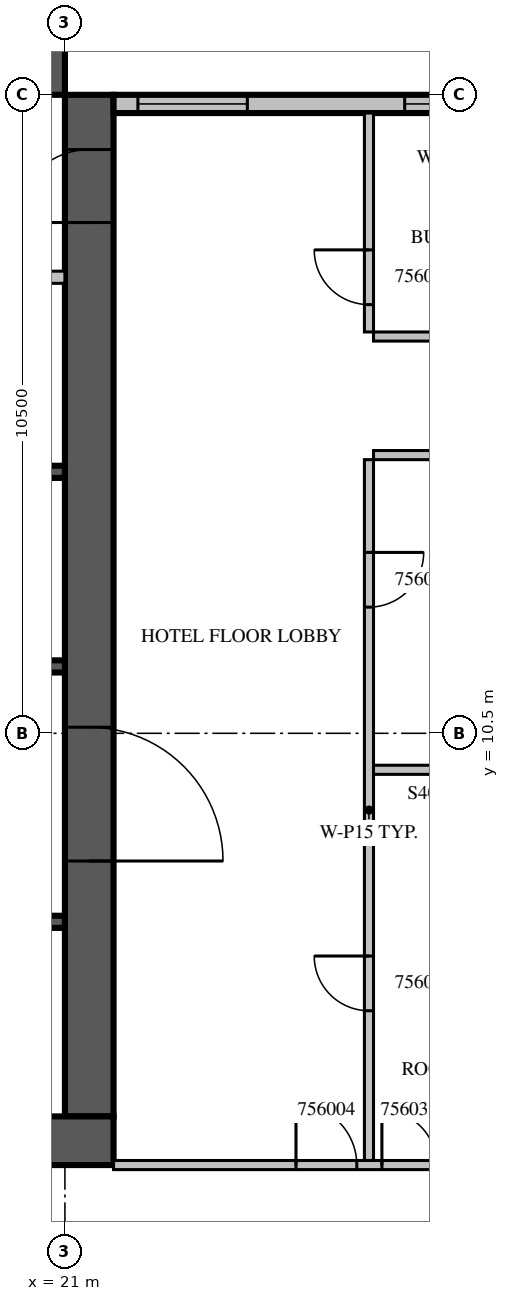
"""IFC4 building model, lengths in metres.
Left out: names, types, materials, properties, quantities, classifications, styles, units other than length and angle.
Written with IfcOpenShell. Run it as: python <this file> out.ifc"""

import sys

from ifc_helpers import new_model, si_unit, direction, frame, frame_2d, origin, place, context, subcontext, project, spatial, rectangle, extrude, source, transform, mapped, element, fill, save


model = new_model("IFC4")
c1 = context("Model", 3, precision=1e-05, world=origin(), true_north=direction((0.0, 1.0)))
c2 = subcontext(c1, "Body", "Model", "MODEL_VIEW")
j1 = project(units=[si_unit("LENGTHUNIT", "METRE"), si_unit("PLANEANGLEUNIT", "RADIAN")], contexts=[c1])
p1 = place(None, origin())
s1 = spatial("IfcSite", under=j1, at=p1, CompositionType="ELEMENT")
p2 = place(p1, origin())
s2 = spatial("IfcBuilding", under=s1, at=p2, CompositionType="ELEMENT")
p3 = place(p2, frame((0.0, 0.0, 246.2)))
s3 = spatial("IfcBuildingStorey", under=s2, at=p3, CompositionType="ELEMENT", Elevation=246.2)
m1 = source(origin(), c2, "Body", "SweptSolid", [
    extrude(rectangle(XDim=16.8, YDim=0.8, at=frame_2d((8.4, 0.0))), origin(), (0.0, 0.0, 1.0), 3.8),
])
p4 = place(p3, frame((21.4, 4.2, 0.0), z_axis=(0.0, 0.0, 1.0), x_axis=(0.0, 1.0, 0.0)))
e1 = element("IfcWall", 1, at=p4, inside=s3, PredefinedType="SHEAR", context=c2, shape_type="MappedRepresentation", body=[
    mapped(m1, transform((0.0, 0.0, 0.0), scale=1.0)),
])
m2 = source(origin(), c2, "Body", "SweptSolid", [
    extrude(rectangle(XDim=2.2, YDim=2.1, at=frame_2d((1.1, 1.05))), frame((0.0, 0.41, 0.0), z_axis=(0.0, -1.0, 0.0), x_axis=(1.0, 0.0, 0.0)), (0.0, 0.0, 1.0), 0.82),
])
p5 = place(p4, frame((4.2, 0.0, 0.0)))
e2 = element("IfcOpeningElement", 2, at=p5, cuts=e1, PredefinedType="OPENING", context=c2, shape_type="MappedRepresentation", body=[
    mapped(m2, transform((0.0, 0.0, 0.0), scale=1.0)),
])
m3 = source(origin(), c2, "Body", "SweptSolid", [
    extrude(rectangle(XDim=1.2, YDim=2.1, at=frame_2d((0.6, 1.05))), frame((0.0, 0.41, 0.0), z_axis=(0.0, -1.0, 0.0), x_axis=(1.0, 0.0, 0.0)), (0.0, 0.0, 1.0), 0.82),
])
p6 = place(p4, frame((14.7, 0.0, 0.0)))
e3 = element("IfcOpeningElement", 3, at=p6, cuts=e1, PredefinedType="OPENING", context=c2, shape_type="MappedRepresentation", body=[
    mapped(m3, transform((0.0, 0.0, 0.0), scale=1.0)),
])
m4 = source(origin(), c2, "Body", "SweptSolid", [
    extrude(rectangle(XDim=17.6, YDim=0.8, at=frame_2d((8.8, 0.0))), origin(), (0.0, 0.0, 1.0), 3.8),
])
p7 = place(p3, frame((4.2, 3.8, 0.0), z_axis=(0.0, 0.0, 1.0), x_axis=(1.0, 0.0, 0.0)))
e4 = element("IfcWall", 4, at=p7, inside=s3, PredefinedType="SHEAR", context=c2, shape_type="MappedRepresentation", body=[
    mapped(m4, transform((0.0, 0.0, 0.0), scale=1.0)),
])
m5 = source(origin(), c2, "Body", "SweptSolid", [
    extrude(rectangle(XDim=0.9, YDim=2.1, at=frame_2d((0.45, 1.05))), frame((0.0, 0.41, 0.0), z_axis=(0.0, -1.0, 0.0), x_axis=(1.0, 0.0, 0.0)), (0.0, 0.0, 1.0), 0.82),
])
p8 = place(p7, frame((12.75, 0.0, 0.0)))
e5 = element("IfcOpeningElement", 5, at=p8, cuts=e4, PredefinedType="OPENING", context=c2, shape_type="MappedRepresentation", body=[
    mapped(m5, transform((0.0, 0.0, 0.0), scale=1.0)),
])
p9 = place(p3, frame((4.2, 21.4, 0.0), z_axis=(0.0, 0.0, 1.0), x_axis=(1.0, 0.0, 0.0)))
e6 = element("IfcWall", 6, at=p9, inside=s3, PredefinedType="SHEAR", context=c2, shape_type="MappedRepresentation", body=[
    mapped(m1, transform((0.0, 0.0, 0.0), scale=1.0)),
])
p10 = place(p9, frame((6.2, 0.0, 0.0)))
e7 = element("IfcOpeningElement", 7, at=p10, cuts=e6, PredefinedType="OPENING", context=c2, shape_type="MappedRepresentation", body=[
    mapped(m3, transform((0.0, 0.0, 0.0), scale=1.0)),
])
m6 = source(origin(), c2, "Body", "SweptSolid", [
    extrude(rectangle(XDim=7.2, YDim=0.3, at=frame_2d((3.6, 0.0))), origin(), (0.0, 0.0, 1.0), 3.4),
])
p11 = place(p3, frame((29.0, 20.85, 0.0), z_axis=(0.0, 0.0, 1.0), x_axis=(-1.0, 0.0, 0.0)))
e8 = element("IfcWall", 8, at=p11, inside=s3, PredefinedType="STANDARD", context=c2, shape_type="MappedRepresentation", body=[
    mapped(m6, transform((0.0, 0.0, 0.0), scale=1.0)),
])
m7 = source(origin(), c2, "Body", "SweptSolid", [
    extrude(rectangle(XDim=1.8, YDim=2.3, at=frame_2d((0.9, 1.15))), frame((0.0, 0.16, 0.0), z_axis=(0.0, -1.0, 0.0), x_axis=(1.0, 0.0, 0.0)), (0.0, 0.0, 1.0), 0.32),
])
p12 = place(p11, frame((0.613, 0.0, 0.6)))
e9 = element("IfcOpeningElement", 9, at=p12, cuts=e8, PredefinedType="OPENING", context=c2, shape_type="MappedRepresentation", body=[
    mapped(m7, transform((0.0, 0.0, 0.0), scale=1.0)),
])
p13 = place(p11, frame((5.0, 0.0, 0.6)))
e10 = element("IfcOpeningElement", 10, at=p13, cuts=e8, PredefinedType="OPENING", context=c2, shape_type="MappedRepresentation", body=[
    mapped(m7, transform((0.0, 0.0, 0.0), scale=1.0)),
])
m8 = source(origin(), c2, "Body", "SweptSolid", [
    extrude(rectangle(XDim=2.4, YDim=0.2, at=frame_2d((1.2, 0.0))), origin(), (0.0, 0.0, 1.0), 3.8),
])
p14 = place(p3, frame((18.6, 7.4, 0.0), z_axis=(0.0, 0.0, 1.0), x_axis=(1.0, 0.0, 0.0)))
e11 = element("IfcWall", 11, at=p14, inside=s3, PredefinedType="SOLIDWALL", context=c2, shape_type="MappedRepresentation", body=[
    mapped(m8, transform((0.0, 0.0, 0.0), scale=1.0)),
])
m9 = source(origin(), c2, "Body", "SweptSolid", [
    extrude(rectangle(XDim=9.6, YDim=0.2, at=frame_2d((4.8, 0.0))), origin(), (0.0, 0.0, 1.0), 3.8),
])
p15 = place(p3, frame((11.4, 11.6, 0.0), z_axis=(0.0, 0.0, 1.0), x_axis=(1.0, 0.0, 0.0)))
e12 = element("IfcWall", 12, at=p15, inside=s3, PredefinedType="SOLIDWALL", context=c2, shape_type="MappedRepresentation", body=[
    mapped(m9, transform((0.0, 0.0, 0.0), scale=1.0)),
])
p16 = place(p3, frame((11.4, 14.8, 0.0), z_axis=(0.0, 0.0, 1.0), x_axis=(1.0, 0.0, 0.0)))
e13 = element("IfcWall", 13, at=p16, inside=s3, PredefinedType="SOLIDWALL", context=c2, shape_type="MappedRepresentation", body=[
    mapped(m9, transform((0.0, 0.0, 0.0), scale=1.0)),
])
m10 = source(origin(), c2, "Body", "SweptSolid", [
    extrude(rectangle(XDim=1.1, YDim=2.1, at=frame_2d((0.55, 1.05))), frame((0.0, 0.11, 0.0), z_axis=(0.0, -1.0, 0.0), x_axis=(1.0, 0.0, 0.0)), (0.0, 0.0, 1.0), 0.22),
])
p17 = place(p16, frame((3.05, 0.0, 0.0)))
e14 = element("IfcOpeningElement", 14, at=p17, cuts=e13, PredefinedType="OPENING", context=c2, shape_type="MappedRepresentation", body=[
    mapped(m10, transform((0.0, 0.0, 0.0), scale=1.0)),
])
p18 = place(p16, frame((5.45, 0.0, 0.0)))
e15 = element("IfcOpeningElement", 15, at=p18, cuts=e13, PredefinedType="OPENING", context=c2, shape_type="MappedRepresentation", body=[
    mapped(m10, transform((0.0, 0.0, 0.0), scale=1.0)),
])
p19 = place(p16, frame((7.85, 0.0, 0.0)))
e16 = element("IfcOpeningElement", 16, at=p19, cuts=e13, PredefinedType="OPENING", context=c2, shape_type="MappedRepresentation", body=[
    mapped(m10, transform((0.0, 0.0, 0.0), scale=1.0)),
])
m11 = source(origin(), c2, "Body", "SweptSolid", [
    extrude(rectangle(XDim=11.45, YDim=0.2, at=frame_2d((5.725, 0.0))), origin(), (0.0, 0.0, 1.0), 3.4),
])
p20 = place(p3, frame((9.55, 18.0, 0.0), z_axis=(0.0, 0.0, 1.0), x_axis=(1.0, 0.0, 0.0)))
e17 = element("IfcWall", 17, at=p20, inside=s3, PredefinedType="PARTITIONING", context=c2, shape_type="MappedRepresentation", body=[
    mapped(m11, transform((0.0, 0.0, 0.0), scale=1.0)),
])
m12 = source(origin(), c2, "Body", "SweptSolid", [
    extrude(rectangle(XDim=0.9, YDim=2.1, at=frame_2d((0.45, 1.05))), frame((0.0, 0.11, 0.0), z_axis=(0.0, -1.0, 0.0), x_axis=(1.0, 0.0, 0.0)), (0.0, 0.0, 1.0), 0.22),
])
p21 = place(p20, frame((0.475, 0.0, 0.0)))
e18 = element("IfcOpeningElement", 18, at=p21, cuts=e17, PredefinedType="OPENING", context=c2, shape_type="MappedRepresentation", body=[
    mapped(m12, transform((0.0, 0.0, 0.0), scale=1.0)),
])
p22 = place(p20, frame((1.85, 0.0, 0.0)))
e19 = element("IfcOpeningElement", 19, at=p22, cuts=e17, PredefinedType="OPENING", context=c2, shape_type="MappedRepresentation", body=[
    mapped(m12, transform((0.0, 0.0, 0.0), scale=1.0)),
])
p23 = place(p20, frame((3.125, 0.0, 0.0)))
e20 = element("IfcOpeningElement", 20, at=p23, cuts=e17, PredefinedType="OPENING", context=c2, shape_type="MappedRepresentation", body=[
    mapped(m12, transform((0.0, 0.0, 0.0), scale=1.0)),
])
p24 = place(p20, frame((7.35, 0.0, 0.0)))
e21 = element("IfcOpeningElement", 21, at=p24, cuts=e17, PredefinedType="OPENING", context=c2, shape_type="MappedRepresentation", body=[
    mapped(m10, transform((0.0, 0.0, 0.0), scale=1.0)),
])
m13 = source(origin(), c2, "Body", "SweptSolid", [
    extrude(rectangle(XDim=11.525, YDim=0.15, at=frame_2d((5.763, 0.0))), origin(), (0.0, 0.0, 1.0), 3.4),
])
p25 = place(p3, frame((26.0, 15.0, 0.0), z_axis=(0.0, 0.0, 1.0), x_axis=(0.0, -1.0, 0.0)))
e22 = element("IfcWall", 22, at=p25, inside=s3, PredefinedType="PARTITIONING", context=c2, shape_type="MappedRepresentation", body=[
    mapped(m13, transform((0.0, 0.0, 0.0), scale=1.0)),
])
m14 = source(origin(), c2, "Body", "SweptSolid", [
    extrude(rectangle(XDim=0.9, YDim=2.1, at=frame_2d((0.45, 1.05))), frame((0.0, 0.085, 0.0), z_axis=(0.0, -1.0, 0.0), x_axis=(1.0, 0.0, 0.0)), (0.0, 0.0, 1.0), 0.17),
])
p26 = place(p25, frame((8.162, 0.0, 0.0)))
e23 = element("IfcOpeningElement", 23, at=p26, cuts=e22, PredefinedType="OPENING", context=c2, shape_type="MappedRepresentation", body=[
    mapped(m14, transform((0.0, 0.0, 0.0), scale=1.0)),
])
p27 = place(p25, frame((1.525, 0.0, 0.0)))
e24 = element("IfcOpeningElement", 24, at=p27, cuts=e22, PredefinedType="OPENING", context=c2, shape_type="MappedRepresentation", body=[
    mapped(m14, transform((0.0, 0.0, 0.0), scale=1.0)),
])
m15 = source(origin(), c2, "Body", "SweptSolid", [
    extrude(rectangle(XDim=3.6, YDim=0.15, at=frame_2d((1.8, 0.0))), origin(), (0.0, 0.0, 1.0), 3.4),
])
p28 = place(p3, frame((26.0, 20.7, 0.0), z_axis=(0.0, 0.0, 1.0), x_axis=(0.0, -1.0, 0.0)))
e25 = element("IfcWall", 25, at=p28, inside=s3, PredefinedType="PARTITIONING", context=c2, shape_type="MappedRepresentation", body=[
    mapped(m15, transform((0.0, 0.0, 0.0), scale=1.0)),
])
p29 = place(p28, frame((2.25, 0.0, 0.0)))
e26 = element("IfcOpeningElement", 26, at=p29, cuts=e25, PredefinedType="OPENING", context=c2, shape_type="MappedRepresentation", body=[
    mapped(m14, transform((0.0, 0.0, 0.0), scale=1.0)),
])
p30 = place(p3, frame((29.325, 9.9, 0.0), z_axis=(0.0, 0.0, 1.0), x_axis=(-1.0, 0.0, 0.0)))
e27 = element("IfcWall", 27, at=p30, inside=s3, PredefinedType="PARTITIONING", context=c2, shape_type="SweptSolid", body=[
    extrude(rectangle(XDim=3.25, YDim=0.15, at=frame_2d((1.625, 0.0))), origin(), (0.0, 0.0, 1.0), 3.4),
])
m16 = source(origin(), c2, "Body", "SweptSolid", [
    extrude(rectangle(XDim=3.25, YDim=0.15, at=frame_2d((1.625, 0.0))), origin(), (0.0, 0.0, 1.0), 3.4),
])
for number, where, z_axis, x_axis in (
    (28, (29.325, 15.075, 0.0), (0.0, 0.0, 1.0), (-1.0, 0.0, 0.0)),
    (29, (26.075, 17.025, 0.0), (0.0, 0.0, 1.0), (1.0, 0.0, 0.0)),
):
    element("IfcWall", number, at=place(p3, frame(where, z_axis=z_axis, x_axis=x_axis)), inside=s3, PredefinedType="PARTITIONING", context=c2, shape_type="MappedRepresentation", body=[
        mapped(m16, transform((0.0, 0.0, 0.0), scale=1.0)),
    ])
m17 = source(origin(), c2, "Body", "SweptSolid", [
    extrude(rectangle(XDim=7.525, YDim=0.15, at=frame_2d((3.763, 0.0))), origin(), (0.0, 0.0, 1.0), 3.4),
])
p31 = place(p3, frame((21.8, 3.4, 0.0), z_axis=(0.0, 0.0, 1.0), x_axis=(1.0, 0.0, 0.0)))
e30 = element("IfcWall", 30, at=p31, inside=s3, PredefinedType="PARTITIONING", context=c2, shape_type="MappedRepresentation", body=[
    mapped(m17, transform((0.0, 0.0, 0.0), scale=1.0)),
])
m18 = source(origin(), c2, "Body", "SweptSolid", [
    extrude(rectangle(XDim=1.0, YDim=2.1, at=frame_2d((0.5, 1.05))), frame((0.0, 0.085, 0.0), z_axis=(0.0, -1.0, 0.0), x_axis=(1.0, 0.0, 0.0)), (0.0, 0.0, 1.0), 0.17),
])
p32 = place(p31, frame((3.0, 0.0, 0.0)))
e31 = element("IfcOpeningElement", 31, at=p32, cuts=e30, PredefinedType="OPENING", context=c2, shape_type="MappedRepresentation", body=[
    mapped(m18, transform((0.0, 0.0, 0.0), scale=1.0)),
])
p33 = place(p31, frame((4.413, 0.0, 0.0)))
e32 = element("IfcOpeningElement", 32, at=p33, cuts=e30, PredefinedType="OPENING", context=c2, shape_type="MappedRepresentation", body=[
    mapped(m14, transform((0.0, 0.0, 0.0), scale=1.0)),
])
m19 = source(origin(), c2, "Body", "SweptSolid", [
    extrude(rectangle(XDim=1.8, YDim=2.3, at=frame_2d((0.9, 1.15))), frame((0.0, 0.03, 0.0), z_axis=(0.0, -1.0, 0.0), x_axis=(1.0, 0.0, 0.0)), (0.0, 0.0, 1.0), 0.06),
])
p34 = place(p12, origin())
e33 = element("IfcWindow", 33, at=p34, inside=s3, PartitioningType="SINGLE_PANEL", PredefinedType="WINDOW", context=c2, shape_type="MappedRepresentation", body=[
    mapped(m19, transform((0.0, 0.0, 0.0), scale=1.0)),
])
fill(e9, e33)
p35 = place(p13, origin())
e34 = element("IfcWindow", 34, at=p35, inside=s3, PartitioningType="SINGLE_PANEL", PredefinedType="WINDOW", context=c2, shape_type="MappedRepresentation", body=[
    mapped(m19, transform((0.0, 0.0, 0.0), scale=1.0)),
])
fill(e10, e34)
m20 = source(origin(), c2, "Body", "SweptSolid", [
    extrude(rectangle(XDim=2.2, YDim=2.1, at=frame_2d((1.1, 1.05))), frame((0.0, 0.025, 0.0), z_axis=(0.0, -1.0, 0.0), x_axis=(1.0, 0.0, 0.0)), (0.0, 0.0, 1.0), 0.05),
])
p36 = place(p5, origin())
e35 = element("IfcDoor", 35, at=p36, inside=s3, OperationType="DOUBLE_DOOR_SINGLE_SWING", PredefinedType="DOOR", context=c2, shape_type="MappedRepresentation", body=[
    mapped(m20, transform((0.0, 0.0, 0.0), scale=1.0)),
])
fill(e2, e35)
m21 = source(origin(), c2, "Body", "SweptSolid", [
    extrude(rectangle(XDim=1.2, YDim=2.1, at=frame_2d((0.6, 1.05))), frame((0.0, 0.025, 0.0), z_axis=(0.0, -1.0, 0.0), x_axis=(1.0, 0.0, 0.0)), (0.0, 0.0, 1.0), 0.05),
])
p37 = place(p6, origin())
e36 = element("IfcDoor", 36, at=p37, inside=s3, OperationType="SINGLE_SWING_LEFT", PredefinedType="DOOR", context=c2, shape_type="MappedRepresentation", body=[
    mapped(m21, transform((0.0, 0.0, 0.0), scale=1.0)),
])
fill(e3, e36)
m22 = source(origin(), c2, "Body", "SweptSolid", [
    extrude(rectangle(XDim=0.9, YDim=2.1, at=frame_2d((0.45, 1.05))), frame((0.0, 0.025, 0.0), z_axis=(0.0, -1.0, 0.0), x_axis=(1.0, 0.0, 0.0)), (0.0, 0.0, 1.0), 0.05),
])
p38 = place(p26, origin())
e37 = element("IfcDoor", 37, at=p38, inside=s3, OperationType="SINGLE_SWING_RIGHT", PredefinedType="DOOR", context=c2, shape_type="MappedRepresentation", body=[
    mapped(m22, transform((0.0, 0.0, 0.0), scale=1.0)),
])
fill(e23, e37)
p39 = place(p27, origin())
e38 = element("IfcDoor", 38, at=p39, inside=s3, OperationType="SINGLE_SWING_LEFT", PredefinedType="DOOR", context=c2, shape_type="MappedRepresentation", body=[
    mapped(m22, transform((0.0, 0.0, 0.0), scale=1.0)),
])
fill(e24, e38)
p40 = place(p29, origin())
e39 = element("IfcDoor", 39, at=p40, inside=s3, OperationType="SINGLE_SWING_RIGHT", PredefinedType="DOOR", context=c2, shape_type="MappedRepresentation", body=[
    mapped(m22, transform((0.0, 0.0, 0.0), scale=1.0)),
])
fill(e26, e39)
m23 = source(origin(), c2, "Body", "SweptSolid", [
    extrude(rectangle(XDim=1.0, YDim=2.1, at=frame_2d((0.5, 1.05))), frame((0.0, 0.025, 0.0), z_axis=(0.0, -1.0, 0.0), x_axis=(1.0, 0.0, 0.0)), (0.0, 0.0, 1.0), 0.05),
])
p41 = place(p32, origin())
e40 = element("IfcDoor", 40, at=p41, inside=s3, OperationType="SINGLE_SWING_LEFT", PredefinedType="DOOR", context=c2, shape_type="MappedRepresentation", body=[
    mapped(m23, transform((0.0, 0.0, 0.0), scale=1.0)),
])
fill(e31, e40)
p42 = place(p33, origin())
e41 = element("IfcDoor", 41, at=p42, inside=s3, OperationType="SINGLE_SWING_LEFT", PredefinedType="DOOR", context=c2, shape_type="MappedRepresentation", body=[
    mapped(m22, transform((0.0, 0.0, 0.0), scale=1.0)),
])
fill(e32, e41)
save(model, sys.argv[1])
